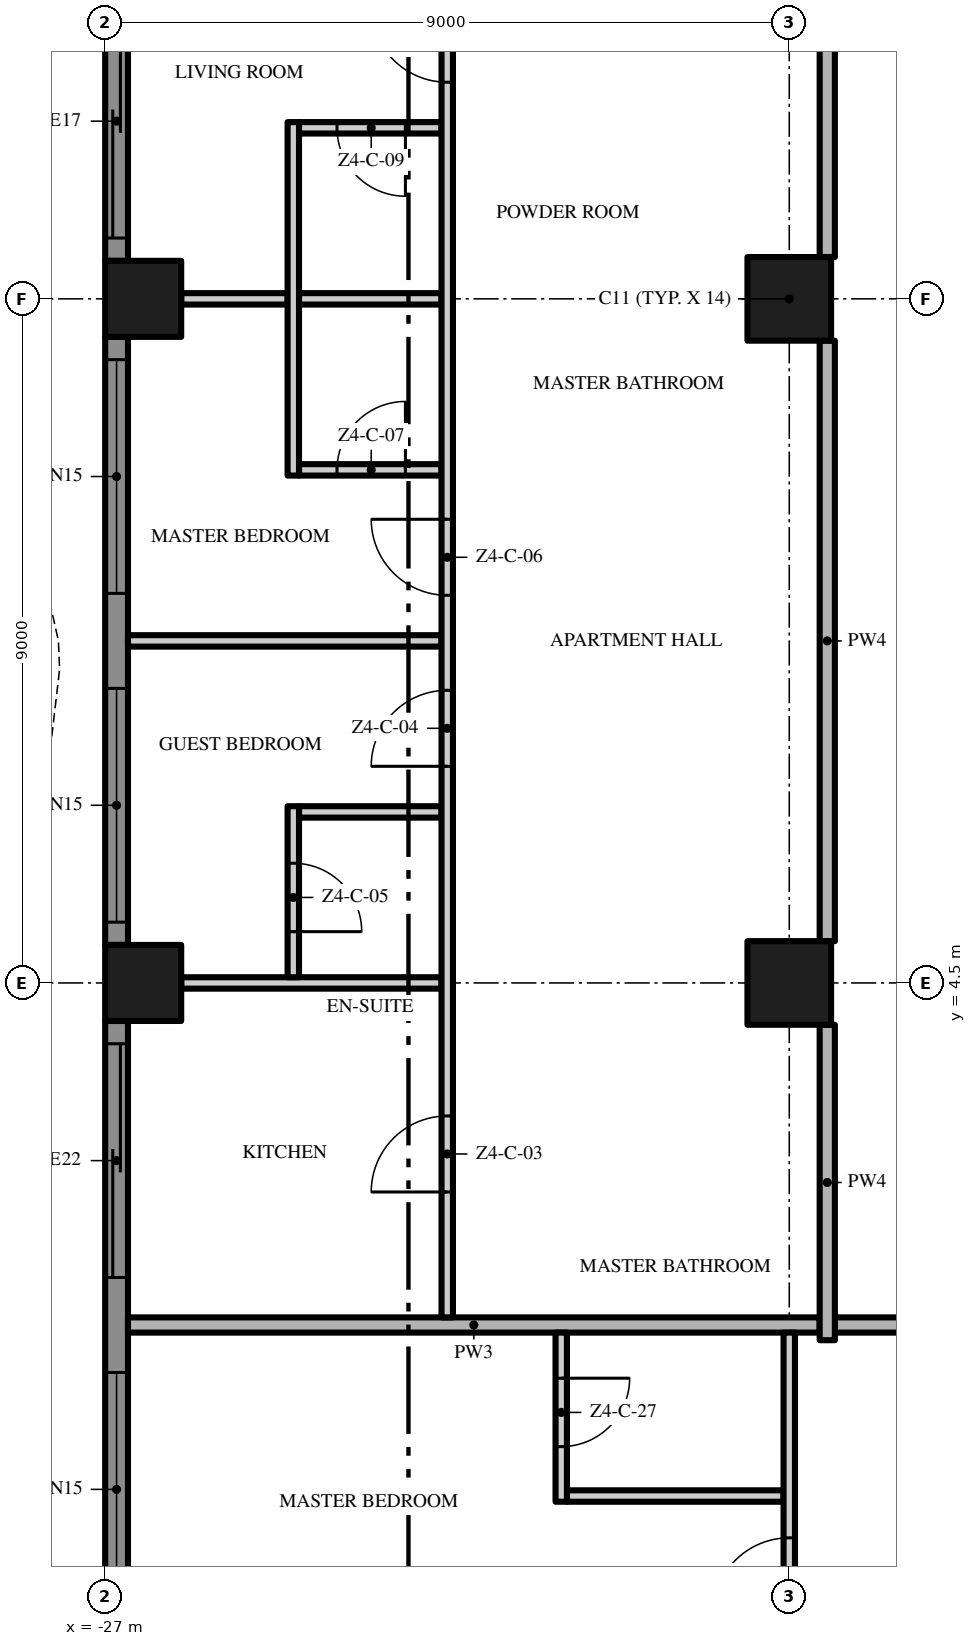
"""IFC4 building model, lengths in metres.
Left out: names, types, materials, properties, quantities, classifications, styles, units other than length and angle.
Written with IfcOpenShell. Run it as: python <this file> out.ifc"""

import sys

from ifc_helpers import new_model, si_unit, direction, frame, frame_2d, origin, origin_2d, place, context, subcontext, project, spatial, polyline, rectangle, outline, extrude, element, fill, save


model = new_model("IFC4")
c1 = context("Model", 3, precision=1e-05, world=origin(), true_north=direction((0.0, 1.0)))
c2 = subcontext(c1, "Body", "Model", "MODEL_VIEW")
j1 = project(units=[si_unit("LENGTHUNIT", "METRE"), si_unit("PLANEANGLEUNIT", "RADIAN")], contexts=[c1])
p1 = place(None, origin())
s1 = spatial("IfcSite", under=j1, at=p1, CompositionType="ELEMENT")
p2 = place(p1, origin())
s2 = spatial("IfcBuilding", under=s1, at=p2, CompositionType="ELEMENT")
p3 = place(p2, frame((0.0, 0.0, 214.8)))
s3 = spatial("IfcBuildingStorey", under=s2, at=p3, CompositionType="ELEMENT", Elevation=214.8)
for number, where, z_axis, x_axis in (
    (1, (-18.0, 13.5, 0.0), (0.0, 0.0, 1.0), (1.0, 0.0, 0.0)),
    (2, (-18.0, 4.5, 0.0), (0.0, 0.0, 1.0), (1.0, 0.0, 0.0)),
):
    element("IfcColumn", number, at=place(p3, frame(where, z_axis=z_axis, x_axis=x_axis)), inside=s3, PredefinedType="COLUMN", context=c2, shape_type="SweptSolid", body=[
        extrude(rectangle(XDim=1.1, YDim=1.1, at=origin_2d()), origin(), (0.0, 0.0, 1.0), 3.5),
    ])
for number, where, z_axis, x_axis in (
    (3, (-26.5, 13.5, 0.0), (0.0, 0.0, 1.0), (1.0, 0.0, 0.0)),
    (4, (-26.5, 4.5, 0.0), (0.0, 0.0, 1.0), (1.0, 0.0, 0.0)),
):
    element("IfcColumn", number, at=place(p3, frame(where, z_axis=z_axis, x_axis=x_axis)), inside=s3, PredefinedType="COLUMN", context=c2, shape_type="SweptSolid", body=[
        extrude(rectangle(XDim=1.0, YDim=1.0, at=origin_2d()), origin(), (0.0, 0.0, 1.0), 3.5),
    ])
p4 = place(p3, frame((-26.85, 14.0, 0.0), z_axis=(0.0, 0.0, 1.0), x_axis=(0.0, 1.0, 0.0)))
e5 = element("IfcWall", 5, at=p4, inside=s3, PredefinedType="SOLIDWALL", context=c2, shape_type="SweptSolid", body=[
    extrude(rectangle(XDim=3.7, YDim=0.3, at=frame_2d((1.85, 0.0))), origin(), (0.0, 0.0, 1.0), 3.5),
])
p5 = place(p4, frame((0.3, 0.0, 0.0)))
e6 = element("IfcOpeningElement", 6, at=p5, cuts=e5, PredefinedType="OPENING", context=c2, shape_type="SweptSolid", body=[
    extrude(rectangle(XDim=3.075, YDim=2.4, at=frame_2d((1.538, 1.2))), frame((0.0, 0.16, 0.0), z_axis=(0.0, -1.0, 0.0), x_axis=(1.0, 0.0, 0.0)), (0.0, 0.0, 1.0), 0.32),
])
p6 = place(p3, frame((-26.85, 5.0, 0.0), z_axis=(0.0, 0.0, 1.0), x_axis=(0.0, 1.0, 0.0)))
e7 = element("IfcWall", 7, at=p6, inside=s3, PredefinedType="SOLIDWALL", context=c2, shape_type="SweptSolid", body=[
    extrude(rectangle(XDim=8.0, YDim=0.3, at=frame_2d((4.0, 0.0))), origin(), (0.0, 0.0, 1.0), 3.5),
])
p7 = place(p6, frame((4.625, 0.0, 0.45)))
e8 = element("IfcOpeningElement", 8, at=p7, cuts=e7, PredefinedType="OPENING", context=c2, shape_type="SweptSolid", body=[
    extrude(rectangle(XDim=3.075, YDim=2.65, at=frame_2d((1.538, 1.325))), frame((0.0, 0.16, 0.0), z_axis=(0.0, -1.0, 0.0), x_axis=(1.0, 0.0, 0.0)), (0.0, 0.0, 1.0), 0.32),
])
p8 = place(p6, frame((0.3, 0.0, 0.45)))
e9 = element("IfcOpeningElement", 9, at=p8, cuts=e7, PredefinedType="OPENING", context=c2, shape_type="SweptSolid", body=[
    extrude(rectangle(XDim=3.075, YDim=2.65, at=frame_2d((1.538, 1.325))), frame((0.0, 0.16, 0.0), z_axis=(0.0, -1.0, 0.0), x_axis=(1.0, 0.0, 0.0)), (0.0, 0.0, 1.0), 0.32),
])
p9 = place(p3, frame((-26.85, -4.0, 0.0), z_axis=(0.0, 0.0, 1.0), x_axis=(0.0, 1.0, 0.0)))
e10 = element("IfcWall", 10, at=p9, inside=s3, PredefinedType="SOLIDWALL", context=c2, shape_type="SweptSolid", body=[
    extrude(rectangle(XDim=8.0, YDim=0.3, at=frame_2d((4.0, 0.0))), origin(), (0.0, 0.0, 1.0), 3.5),
])
p10 = place(p9, frame((4.625, 0.0, 0.0)))
e11 = element("IfcOpeningElement", 11, at=p10, cuts=e10, PredefinedType="OPENING", context=c2, shape_type="SweptSolid", body=[
    extrude(rectangle(XDim=3.075, YDim=2.4, at=frame_2d((1.538, 1.2))), frame((0.0, 0.16, 0.0), z_axis=(0.0, -1.0, 0.0), x_axis=(1.0, 0.0, 0.0)), (0.0, 0.0, 1.0), 0.32),
])
p11 = place(p9, frame((0.3, 0.0, 0.45)))
e12 = element("IfcOpeningElement", 12, at=p11, cuts=e10, PredefinedType="OPENING", context=c2, shape_type="SweptSolid", body=[
    extrude(rectangle(XDim=3.075, YDim=2.65, at=frame_2d((1.538, 1.325))), frame((0.0, 0.16, 0.0), z_axis=(0.0, -1.0, 0.0), x_axis=(1.0, 0.0, 0.0)), (0.0, 0.0, 1.0), 0.32),
])
p12 = place(p3, origin())
e13 = element("IfcWall", 13, at=p12, inside=s3, PredefinedType="USERDEFINED", context=c2, shape_type="SweptSolid", body=[
    extrude(outline(polyline([(-29.649, 18.0), (-29.985, 16.5), (-30.0, 16.125), (-29.869, 15.0), (-29.345, 13.5), (-28.612, 12.0), (-27.951, 10.5), (-27.615, 9.0), (-27.6, 8.625), (-27.731, 7.5), (-28.255, 6.0), (-28.988, 4.5), (-29.649, 3.0), (-29.985, 1.5), (-30.0, 1.125), (-29.869, 0.0), (-29.345, -1.5), (-28.612, -3.0), (-27.951, -4.5), (-27.615, -6.0), (-27.6, -6.375), (-27.731, -7.5), (-28.255, -9.0), (-28.988, -10.5), (-29.649, -12.0), (-29.985, -13.5), (-30.0, -13.875), (-29.869, -15.0), (-29.345, -16.5), (-28.612, -18.0), (-28.388, -17.89), (-29.114, -16.404), (-29.624, -14.944), (-29.749, -13.865), (-29.736, -13.533), (-29.41, -12.079), (-28.761, -10.605), (-28.024, -9.096), (-27.486, -7.556), (-27.349, -6.385), (-27.366, -5.967), (-27.713, -4.421), (-28.385, -2.895), (-29.114, -1.404), (-29.624, 0.056), (-29.749, 1.135), (-29.736, 1.467), (-29.41, 2.921), (-28.761, 4.395), (-28.024, 5.904), (-27.486, 7.444), (-27.349, 8.615), (-27.366, 9.033), (-27.713, 10.579), (-28.385, 12.105), (-29.114, 13.596), (-29.624, 15.056), (-29.749, 16.135), (-29.736, 16.467), (-29.405, 17.945), (-29.649, 18.0)])), origin(), (0.0, 0.0, 1.0), 0.9),
])
p13 = place(p3, frame((-20.925, -2.25, 0.0), z_axis=(0.0, 0.0, 1.0), x_axis=(1.0, 0.0, 0.0)))
e14 = element("IfcWall", 14, at=p13, inside=s3, PredefinedType="PARTITIONING", context=c2, shape_type="SweptSolid", body=[
    extrude(rectangle(XDim=2.85, YDim=0.15, at=frame_2d((1.425, 0.0))), origin(), (0.0, 0.0, 1.0), 3.5),
])
p14 = place(p3, frame((-17.4, 0.0, 0.0), z_axis=(0.0, 0.0, 1.0), x_axis=(1.0, 0.0, 0.0)))
e15 = element("IfcWall", 15, at=p14, inside=s3, PredefinedType="PARTITIONING", context=c2, shape_type="SweptSolid", body=[
    extrude(rectangle(XDim=12.8, YDim=0.2, at=frame_2d((6.4, 0.0))), origin(), (0.0, 0.0, 1.0), 3.5),
])
p15 = place(p3, frame((-26.7, 0.0, 0.0), z_axis=(0.0, 0.0, 1.0), x_axis=(1.0, 0.0, 0.0)))
e16 = element("IfcWall", 16, at=p15, inside=s3, PredefinedType="PARTITIONING", context=c2, shape_type="SweptSolid", body=[
    extrude(rectangle(XDim=9.1, YDim=0.2, at=frame_2d((4.55, 0.0))), origin(), (0.0, 0.0, 1.0), 3.5),
])
p16 = place(p3, frame((-26.0, 4.5, 0.0), z_axis=(0.0, 0.0, 1.0), x_axis=(1.0, 0.0, 0.0)))
e17 = element("IfcWall", 17, at=p16, inside=s3, PredefinedType="PARTITIONING", context=c2, shape_type="SweptSolid", body=[
    extrude(rectangle(XDim=3.425, YDim=0.15, at=frame_2d((1.712, 0.0))), origin(), (0.0, 0.0, 1.0), 3.5),
])
p17 = place(p3, frame((-24.45, 6.75, 0.0), z_axis=(0.0, 0.0, 1.0), x_axis=(1.0, 0.0, 0.0)))
e18 = element("IfcWall", 18, at=p17, inside=s3, PredefinedType="PARTITIONING", context=c2, shape_type="SweptSolid", body=[
    extrude(rectangle(XDim=1.875, YDim=0.15, at=frame_2d((0.938, 0.0))), origin(), (0.0, 0.0, 1.0), 3.5),
])
p18 = place(p3, frame((-26.7, 9.0, 0.0), z_axis=(0.0, 0.0, 1.0), x_axis=(1.0, 0.0, 0.0)))
e19 = element("IfcWall", 19, at=p18, inside=s3, PredefinedType="PARTITIONING", context=c2, shape_type="SweptSolid", body=[
    extrude(rectangle(XDim=4.125, YDim=0.15, at=frame_2d((2.062, 0.0))), origin(), (0.0, 0.0, 1.0), 3.5),
])
p19 = place(p3, frame((-24.45, 11.25, 0.0), z_axis=(0.0, 0.0, 1.0), x_axis=(1.0, 0.0, 0.0)))
e20 = element("IfcWall", 20, at=p19, inside=s3, PredefinedType="PARTITIONING", context=c2, shape_type="SweptSolid", body=[
    extrude(rectangle(XDim=1.875, YDim=0.15, at=frame_2d((0.938, 0.0))), origin(), (0.0, 0.0, 1.0), 3.5),
])
p20 = place(p19, frame((0.5, 0.0, 0.0)))
e21 = element("IfcOpeningElement", 21, at=p20, cuts=e20, PredefinedType="OPENING", context=c2, shape_type="SweptSolid", body=[
    extrude(rectangle(XDim=0.9, YDim=2.1, at=frame_2d((0.45, 1.05))), frame((0.0, 0.085, 0.0), z_axis=(0.0, -1.0, 0.0), x_axis=(1.0, 0.0, 0.0)), (0.0, 0.0, 1.0), 0.17),
])
p21 = place(p3, frame((-26.0, 13.5, 0.0), z_axis=(0.0, 0.0, 1.0), x_axis=(1.0, 0.0, 0.0)))
e22 = element("IfcWall", 22, at=p21, inside=s3, PredefinedType="PARTITIONING", context=c2, shape_type="SweptSolid", body=[
    extrude(rectangle(XDim=1.4, YDim=0.15, at=frame_2d((0.7, 0.0))), origin(), (0.0, 0.0, 1.0), 3.5),
])
p22 = place(p3, frame((-24.45, 13.5, 0.0), z_axis=(0.0, 0.0, 1.0), x_axis=(1.0, 0.0, 0.0)))
e23 = element("IfcWall", 23, at=p22, inside=s3, PredefinedType="PARTITIONING", context=c2, shape_type="SweptSolid", body=[
    extrude(rectangle(XDim=1.875, YDim=0.15, at=frame_2d((0.938, 0.0))), origin(), (0.0, 0.0, 1.0), 3.5),
])
p23 = place(p3, frame((-22.575, 15.75, 0.0), z_axis=(0.0, 0.0, 1.0), x_axis=(-1.0, 0.0, 0.0)))
e24 = element("IfcWall", 24, at=p23, inside=s3, PredefinedType="PARTITIONING", context=c2, shape_type="SweptSolid", body=[
    extrude(rectangle(XDim=1.875, YDim=0.15, at=frame_2d((0.938, 0.0))), origin(), (0.0, 0.0, 1.0), 3.5),
])
p24 = place(p23, frame((0.475, 0.0, 0.0)))
e25 = element("IfcOpeningElement", 25, at=p24, cuts=e24, PredefinedType="OPENING", context=c2, shape_type="SweptSolid", body=[
    extrude(rectangle(XDim=0.9, YDim=2.1, at=frame_2d((0.45, 1.05))), frame((0.0, 0.085, 0.0), z_axis=(0.0, -1.0, 0.0), x_axis=(1.0, 0.0, 0.0)), (0.0, 0.0, 1.0), 0.17),
])
p25 = place(p3, frame((-24.525, 6.825, 0.0), z_axis=(0.0, 0.0, 1.0), x_axis=(0.0, -1.0, 0.0)))
e26 = element("IfcWall", 26, at=p25, inside=s3, PredefinedType="PARTITIONING", context=c2, shape_type="SweptSolid", body=[
    extrude(rectangle(XDim=2.25, YDim=0.15, at=frame_2d((1.125, 0.0))), origin(), (0.0, 0.0, 1.0), 3.5),
])
p26 = place(p25, frame((0.75, 0.0, 0.0)))
e27 = element("IfcOpeningElement", 27, at=p26, cuts=e26, PredefinedType="OPENING", context=c2, shape_type="SweptSolid", body=[
    extrude(rectangle(XDim=0.9, YDim=2.1, at=frame_2d((0.45, 1.05))), frame((0.0, 0.085, 0.0), z_axis=(0.0, -1.0, 0.0), x_axis=(1.0, 0.0, 0.0)), (0.0, 0.0, 1.0), 0.17),
])
p27 = place(p3, frame((-24.525, 11.175, 0.0), z_axis=(0.0, 0.0, 1.0), x_axis=(0.0, 1.0, 0.0)))
e28 = element("IfcWall", 28, at=p27, inside=s3, PredefinedType="PARTITIONING", context=c2, shape_type="SweptSolid", body=[
    extrude(rectangle(XDim=4.65, YDim=0.15, at=frame_2d((2.325, 0.0))), origin(), (0.0, 0.0, 1.0), 3.5),
])
p28 = place(p3, frame((-22.5, 0.1, 0.0), z_axis=(0.0, 0.0, 1.0), x_axis=(0.0, 1.0, 0.0)))
e29 = element("IfcWall", 29, at=p28, inside=s3, PredefinedType="PARTITIONING", context=c2, shape_type="SweptSolid", body=[
    extrude(rectangle(XDim=17.4, YDim=0.15, at=frame_2d((8.7, 0.0))), origin(), (0.0, 0.0, 1.0), 3.5),
])
p29 = place(p28, frame((1.65, 0.0, 0.0)))
e30 = element("IfcOpeningElement", 30, at=p29, cuts=e29, PredefinedType="OPENING", context=c2, shape_type="SweptSolid", body=[
    extrude(rectangle(XDim=1.0, YDim=2.4, at=frame_2d((0.5, 1.2))), frame((0.0, 0.085, 0.0), z_axis=(0.0, -1.0, 0.0), x_axis=(1.0, 0.0, 0.0)), (0.0, 0.0, 1.0), 0.17),
])
p30 = place(p28, frame((7.25, 0.0, 0.0)))
e31 = element("IfcOpeningElement", 31, at=p30, cuts=e29, PredefinedType="OPENING", context=c2, shape_type="SweptSolid", body=[
    extrude(rectangle(XDim=1.0, YDim=2.4, at=frame_2d((0.5, 1.2))), frame((0.0, 0.085, 0.0), z_axis=(0.0, -1.0, 0.0), x_axis=(1.0, 0.0, 0.0)), (0.0, 0.0, 1.0), 0.17),
])
p31 = place(p28, frame((9.5, 0.0, 0.0)))
e32 = element("IfcOpeningElement", 32, at=p31, cuts=e29, PredefinedType="OPENING", context=c2, shape_type="SweptSolid", body=[
    extrude(rectangle(XDim=1.0, YDim=2.4, at=frame_2d((0.5, 1.2))), frame((0.0, 0.085, 0.0), z_axis=(0.0, -1.0, 0.0), x_axis=(1.0, 0.0, 0.0)), (0.0, 0.0, 1.0), 0.17),
])
p32 = place(p28, frame((16.25, 0.0, 0.0)))
e33 = element("IfcOpeningElement", 33, at=p32, cuts=e29, PredefinedType="OPENING", context=c2, shape_type="SweptSolid", body=[
    extrude(rectangle(XDim=1.0, YDim=2.4, at=frame_2d((0.5, 1.2))), frame((0.0, 0.085, 0.0), z_axis=(0.0, -1.0, 0.0), x_axis=(1.0, 0.0, 0.0)), (0.0, 0.0, 1.0), 0.17),
])
p33 = place(p3, frame((-21.0, -0.1, 0.0), z_axis=(0.0, 0.0, 1.0), x_axis=(0.0, -1.0, 0.0)))
e34 = element("IfcWall", 34, at=p33, inside=s3, PredefinedType="PARTITIONING", context=c2, shape_type="SweptSolid", body=[
    extrude(rectangle(XDim=2.225, YDim=0.15, at=frame_2d((1.113, 0.0))), origin(), (0.0, 0.0, 1.0), 3.5),
])
p34 = place(p33, frame((0.6, 0.0, 0.0)))
e35 = element("IfcOpeningElement", 35, at=p34, cuts=e34, PredefinedType="OPENING", context=c2, shape_type="SweptSolid", body=[
    extrude(rectangle(XDim=0.9, YDim=2.1, at=frame_2d((0.45, 1.05))), frame((0.0, 0.085, 0.0), z_axis=(0.0, -1.0, 0.0), x_axis=(1.0, 0.0, 0.0)), (0.0, 0.0, 1.0), 0.17),
])
p35 = place(p3, frame((-18.0, -3.95, 0.0), z_axis=(0.0, 0.0, 1.0), x_axis=(0.0, 1.0, 0.0)))
e36 = element("IfcWall", 36, at=p35, inside=s3, PredefinedType="PARTITIONING", context=c2, shape_type="SweptSolid", body=[
    extrude(rectangle(XDim=3.85, YDim=0.15, at=frame_2d((1.925, 0.0))), origin(), (0.0, 0.0, 1.0), 3.5),
])
p36 = place(p35, frame((0.15, 0.0, 0.0)))
e37 = element("IfcOpeningElement", 37, at=p36, cuts=e36, PredefinedType="OPENING", context=c2, shape_type="SweptSolid", body=[
    extrude(rectangle(XDim=1.0, YDim=2.4, at=frame_2d((0.5, 1.2))), frame((0.0, 0.085, 0.0), z_axis=(0.0, -1.0, 0.0), x_axis=(1.0, 0.0, 0.0)), (0.0, 0.0, 1.0), 0.17),
])
p37 = place(p3, frame((-17.5, -0.2, 0.0), z_axis=(0.0, 0.0, 1.0), x_axis=(0.0, 1.0, 0.0)))
e38 = element("IfcWall", 38, at=p37, inside=s3, PredefinedType="PARTITIONING", context=c2, shape_type="SweptSolid", body=[
    extrude(rectangle(XDim=4.15, YDim=0.2, at=frame_2d((2.075, 0.0))), origin(), (0.0, 0.0, 1.0), 3.5),
])
p38 = place(p3, frame((-17.5, 5.05, 0.0), z_axis=(0.0, 0.0, 1.0), x_axis=(0.0, 1.0, 0.0)))
e39 = element("IfcWall", 39, at=p38, inside=s3, PredefinedType="PARTITIONING", context=c2, shape_type="SweptSolid", body=[
    extrude(rectangle(XDim=7.9, YDim=0.2, at=frame_2d((3.95, 0.0))), origin(), (0.0, 0.0, 1.0), 3.5),
])
p39 = place(p3, frame((-17.5, 14.05, 0.0), z_axis=(0.0, 0.0, 1.0), x_axis=(0.0, 1.0, 0.0)))
e40 = element("IfcWall", 40, at=p39, inside=s3, PredefinedType="PARTITIONING", context=c2, shape_type="SweptSolid", body=[
    extrude(rectangle(XDim=7.45, YDim=0.2, at=frame_2d((3.725, 0.0))), origin(), (0.0, 0.0, 1.0), 3.5),
])
p40 = place(p39, frame((3.35, 0.0, 0.0)))
e41 = element("IfcOpeningElement", 41, at=p40, cuts=e40, PredefinedType="OPENING", context=c2, shape_type="SweptSolid", body=[
    extrude(rectangle(XDim=1.2, YDim=2.4, at=frame_2d((0.6, 1.2))), frame((0.0, 0.11, 0.0), z_axis=(0.0, -1.0, 0.0), x_axis=(1.0, 0.0, 0.0)), (0.0, 0.0, 1.0), 0.22),
])
p41 = place(p5, origin())
e42 = element("IfcDoor", 42, at=p41, inside=s3, OperationType="SINGLE_SWING_LEFT", PredefinedType="DOOR", context=c2, shape_type="SweptSolid", body=[
    extrude(rectangle(XDim=3.075, YDim=2.4, at=frame_2d((1.538, 1.2))), frame((0.0, 0.025, 0.0), z_axis=(0.0, -1.0, 0.0), x_axis=(1.0, 0.0, 0.0)), (0.0, 0.0, 1.0), 0.05),
])
fill(e6, e42)
p42 = place(p7, origin())
e43 = element("IfcWindow", 43, at=p42, inside=s3, PartitioningType="SINGLE_PANEL", PredefinedType="WINDOW", context=c2, shape_type="SweptSolid", body=[
    extrude(rectangle(XDim=3.075, YDim=2.65, at=frame_2d((1.538, 1.325))), frame((0.0, 0.03, 0.0), z_axis=(0.0, -1.0, 0.0), x_axis=(1.0, 0.0, 0.0)), (0.0, 0.0, 1.0), 0.06),
])
fill(e8, e43)
p43 = place(p8, origin())
e44 = element("IfcWindow", 44, at=p43, inside=s3, PartitioningType="SINGLE_PANEL", PredefinedType="WINDOW", context=c2, shape_type="SweptSolid", body=[
    extrude(rectangle(XDim=3.075, YDim=2.65, at=frame_2d((1.538, 1.325))), frame((0.0, 0.03, 0.0), z_axis=(0.0, -1.0, 0.0), x_axis=(1.0, 0.0, 0.0)), (0.0, 0.0, 1.0), 0.06),
])
fill(e9, e44)
p44 = place(p10, origin())
e45 = element("IfcDoor", 45, at=p44, inside=s3, OperationType="SINGLE_SWING_LEFT", PredefinedType="DOOR", context=c2, shape_type="SweptSolid", body=[
    extrude(rectangle(XDim=3.075, YDim=2.4, at=frame_2d((1.538, 1.2))), frame((0.0, 0.025, 0.0), z_axis=(0.0, -1.0, 0.0), x_axis=(1.0, 0.0, 0.0)), (0.0, 0.0, 1.0), 0.05),
])
fill(e11, e45)
p45 = place(p11, origin())
e46 = element("IfcWindow", 46, at=p45, inside=s3, PartitioningType="SINGLE_PANEL", PredefinedType="WINDOW", context=c2, shape_type="SweptSolid", body=[
    extrude(rectangle(XDim=3.075, YDim=2.65, at=frame_2d((1.538, 1.325))), frame((0.0, 0.03, 0.0), z_axis=(0.0, -1.0, 0.0), x_axis=(1.0, 0.0, 0.0)), (0.0, 0.0, 1.0), 0.06),
])
fill(e12, e46)
p46 = place(p29, origin())
e47 = element("IfcDoor", 47, at=p46, inside=s3, OperationType="SINGLE_SWING_LEFT", PredefinedType="DOOR", context=c2, shape_type="SweptSolid", body=[
    extrude(rectangle(XDim=1.0, YDim=2.4, at=frame_2d((0.5, 1.2))), frame((0.0, 0.025, 0.0), z_axis=(0.0, -1.0, 0.0), x_axis=(1.0, 0.0, 0.0)), (0.0, 0.0, 1.0), 0.05),
])
fill(e30, e47)
p47 = place(p30, origin())
e48 = element("IfcDoor", 48, at=p47, inside=s3, OperationType="SINGLE_SWING_LEFT", PredefinedType="DOOR", context=c2, shape_type="SweptSolid", body=[
    extrude(rectangle(XDim=1.0, YDim=2.4, at=frame_2d((0.5, 1.2))), frame((0.0, 0.025, 0.0), z_axis=(0.0, -1.0, 0.0), x_axis=(1.0, 0.0, 0.0)), (0.0, 0.0, 1.0), 0.05),
])
fill(e31, e48)
p48 = place(p26, origin())
e49 = element("IfcDoor", 49, at=p48, inside=s3, OperationType="SINGLE_SWING_RIGHT", PredefinedType="DOOR", context=c2, shape_type="SweptSolid", body=[
    extrude(rectangle(XDim=0.9, YDim=2.1, at=frame_2d((0.45, 1.05))), frame((0.0, 0.025, 0.0), z_axis=(0.0, -1.0, 0.0), x_axis=(1.0, 0.0, 0.0)), (0.0, 0.0, 1.0), 0.05),
])
fill(e27, e49)
p49 = place(p31, origin())
e50 = element("IfcDoor", 50, at=p49, inside=s3, OperationType="SINGLE_SWING_RIGHT", PredefinedType="DOOR", context=c2, shape_type="SweptSolid", body=[
    extrude(rectangle(XDim=1.0, YDim=2.4, at=frame_2d((0.5, 1.2))), frame((0.0, 0.025, 0.0), z_axis=(0.0, -1.0, 0.0), x_axis=(1.0, 0.0, 0.0)), (0.0, 0.0, 1.0), 0.05),
])
fill(e32, e50)
p50 = place(p20, origin())
e51 = element("IfcDoor", 51, at=p50, inside=s3, OperationType="SINGLE_SWING_RIGHT", PredefinedType="DOOR", context=c2, shape_type="SweptSolid", body=[
    extrude(rectangle(XDim=0.9, YDim=2.1, at=frame_2d((0.45, 1.05))), frame((0.0, 0.025, 0.0), z_axis=(0.0, -1.0, 0.0), x_axis=(1.0, 0.0, 0.0)), (0.0, 0.0, 1.0), 0.05),
])
fill(e21, e51)
p51 = place(p32, origin())
e52 = element("IfcDoor", 52, at=p51, inside=s3, OperationType="SINGLE_SWING_RIGHT", PredefinedType="DOOR", context=c2, shape_type="SweptSolid", body=[
    extrude(rectangle(XDim=1.0, YDim=2.4, at=frame_2d((0.5, 1.2))), frame((0.0, 0.025, 0.0), z_axis=(0.0, -1.0, 0.0), x_axis=(1.0, 0.0, 0.0)), (0.0, 0.0, 1.0), 0.05),
])
fill(e33, e52)
p52 = place(p24, origin())
e53 = element("IfcDoor", 53, at=p52, inside=s3, OperationType="SINGLE_SWING_LEFT", PredefinedType="DOOR", context=c2, shape_type="SweptSolid", body=[
    extrude(rectangle(XDim=0.9, YDim=2.1, at=frame_2d((0.45, 1.05))), frame((0.0, 0.025, 0.0), z_axis=(0.0, -1.0, 0.0), x_axis=(1.0, 0.0, 0.0)), (0.0, 0.0, 1.0), 0.05),
])
fill(e25, e53)
p53 = place(p36, origin())
e54 = element("IfcDoor", 54, at=p53, inside=s3, OperationType="SINGLE_SWING_LEFT", PredefinedType="DOOR", context=c2, shape_type="SweptSolid", body=[
    extrude(rectangle(XDim=1.0, YDim=2.4, at=frame_2d((0.5, 1.2))), frame((0.0, 0.025, 0.0), z_axis=(0.0, -1.0, 0.0), x_axis=(1.0, 0.0, 0.0)), (0.0, 0.0, 1.0), 0.05),
])
fill(e37, e54)
p54 = place(p34, origin())
e55 = element("IfcDoor", 55, at=p54, inside=s3, OperationType="SINGLE_SWING_LEFT", PredefinedType="DOOR", context=c2, shape_type="SweptSolid", body=[
    extrude(rectangle(XDim=0.9, YDim=2.1, at=frame_2d((0.45, 1.05))), frame((0.0, 0.025, 0.0), z_axis=(0.0, -1.0, 0.0), x_axis=(1.0, 0.0, 0.0)), (0.0, 0.0, 1.0), 0.05),
])
fill(e35, e55)
save(model, sys.argv[1])
